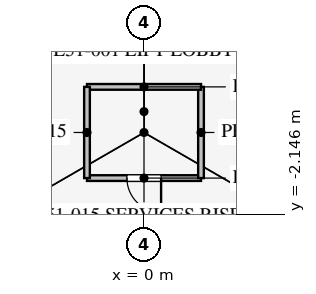
"""IFC4 building model, lengths in metres.
Left out: names, types, materials, properties, quantities, classifications, styles, units other than length and angle.
Written with IfcOpenShell. Run it as: python <this file> out.ifc"""

import sys

from ifc_helpers import new_model, si_unit, direction, frame, frame_2d, origin, place, context, subcontext, project, spatial, rectangle, extrude, element, fill, save


model = new_model("IFC4")
c1 = context("Model", 3, precision=1e-05, world=origin(), true_north=direction((0.0, 1.0)))
c2 = subcontext(c1, "Body", "Model", "MODEL_VIEW")
j1 = project(units=[si_unit("LENGTHUNIT", "METRE"), si_unit("PLANEANGLEUNIT", "RADIAN")], contexts=[c1])
p1 = place(None, origin())
s1 = spatial("IfcSite", under=j1, at=p1, CompositionType="ELEMENT")
p2 = place(p1, origin())
s2 = spatial("IfcBuilding", under=s1, at=p2, CompositionType="ELEMENT")
p3 = place(p2, frame((0.0, 0.0, 223.3)))
s3 = spatial("IfcBuildingStorey", under=s2, at=p3, CompositionType="ELEMENT", Elevation=223.3)
p4 = place(p3, frame((-1.5, -1.2, 0.0), z_axis=(0.0, 0.0, 1.0), x_axis=(1.0, 0.0, 0.0)))
e1 = element("IfcWall", 1, at=p4, inside=s3, PredefinedType="PARTITIONING", context=c2, shape_type="SweptSolid", body=[
    extrude(rectangle(XDim=3.0, YDim=0.15, at=frame_2d((1.5, 0.0))), origin(), (0.0, 0.0, 1.0), 4.0),
])
p5 = place(p4, frame((1.05, 0.0, 0.0)))
e2 = element("IfcOpeningElement", 2, at=p5, cuts=e1, PredefinedType="OPENING", context=c2, shape_type="SweptSolid", body=[
    extrude(rectangle(XDim=0.9, YDim=2.1, at=frame_2d((0.45, 1.05))), frame((0.0, 0.085, 0.0), z_axis=(0.0, -1.0, 0.0), x_axis=(1.0, 0.0, 0.0)), (0.0, 0.0, 1.0), 0.17),
])
p6 = place(p3, frame((1.5, -1.2, 0.0), z_axis=(0.0, 0.0, 1.0), x_axis=(0.0, 1.0, 0.0)))
e3 = element("IfcWall", 3, at=p6, inside=s3, PredefinedType="PARTITIONING", context=c2, shape_type="SweptSolid", body=[
    extrude(rectangle(XDim=2.4, YDim=0.15, at=frame_2d((1.2, 0.0))), origin(), (0.0, 0.0, 1.0), 4.0),
])
p7 = place(p3, frame((1.5, 1.2, 0.0), z_axis=(0.0, 0.0, 1.0), x_axis=(-1.0, 0.0, 0.0)))
e4 = element("IfcWall", 4, at=p7, inside=s3, PredefinedType="PARTITIONING", context=c2, shape_type="SweptSolid", body=[
    extrude(rectangle(XDim=3.0, YDim=0.15, at=frame_2d((1.5, 0.0))), origin(), (0.0, 0.0, 1.0), 4.0),
])
p8 = place(p3, frame((-1.5, 1.2, 0.0), z_axis=(0.0, 0.0, 1.0), x_axis=(0.0, -1.0, 0.0)))
e5 = element("IfcWall", 5, at=p8, inside=s3, PredefinedType="PARTITIONING", context=c2, shape_type="SweptSolid", body=[
    extrude(rectangle(XDim=2.4, YDim=0.15, at=frame_2d((1.2, 0.0))), origin(), (0.0, 0.0, 1.0), 4.0),
])
p9 = place(p3, frame((-0.016, 30.392, 0.0), z_axis=(0.0, 0.0, 1.0), x_axis=(-0.500000626146, -0.866025042278, 0.0)))
e6 = element("IfcWall", 6, at=p9, inside=s3, PredefinedType="PARTITIONING", context=c2, shape_type="SweptSolid", body=[
    extrude(rectangle(XDim=52.624, YDim=0.12, at=frame_2d((26.312, 0.0))), origin(), (0.0, 0.0, 1.0), 2.9),
])
p10 = place(p9, frame((10.15, 0.0, 0.15)))
e7 = element("IfcOpeningElement", 7, at=p10, cuts=e6, PredefinedType="OPENING", context=c2, shape_type="SweptSolid", body=[
    extrude(rectangle(XDim=1.8, YDim=2.1, at=frame_2d((0.9, 1.05))), frame((0.0, 0.07, 0.0), z_axis=(0.0, -1.0, 0.0), x_axis=(1.0, 0.0, 0.0)), (0.0, 0.0, 1.0), 0.14),
])
p11 = place(p9, frame((40.65, 0.0, 0.15)))
e8 = element("IfcOpeningElement", 8, at=p11, cuts=e6, PredefinedType="OPENING", context=c2, shape_type="SweptSolid", body=[
    extrude(rectangle(XDim=1.8, YDim=2.1, at=frame_2d((0.9, 1.05))), frame((0.0, 0.07, 0.0), z_axis=(0.0, -1.0, 0.0), x_axis=(1.0, 0.0, 0.0)), (0.0, 0.0, 1.0), 0.14),
])
p12 = place(p5, frame((0.9, 0.0, 0.0), z_axis=(0.0, 0.0, 1.0), x_axis=(-1.0, 0.0, 0.0)))
e9 = element("IfcDoor", 9, at=p12, inside=s3, OperationType="SINGLE_SWING_LEFT", PredefinedType="DOOR", context=c2, shape_type="SweptSolid", body=[
    extrude(rectangle(XDim=0.9, YDim=2.1, at=frame_2d((0.45, 1.05))), frame((0.0, 0.025, 0.0), z_axis=(0.0, -1.0, 0.0), x_axis=(1.0, 0.0, 0.0)), (0.0, 0.0, 1.0), 0.05),
])
fill(e2, e9)
save(model, sys.argv[1])
